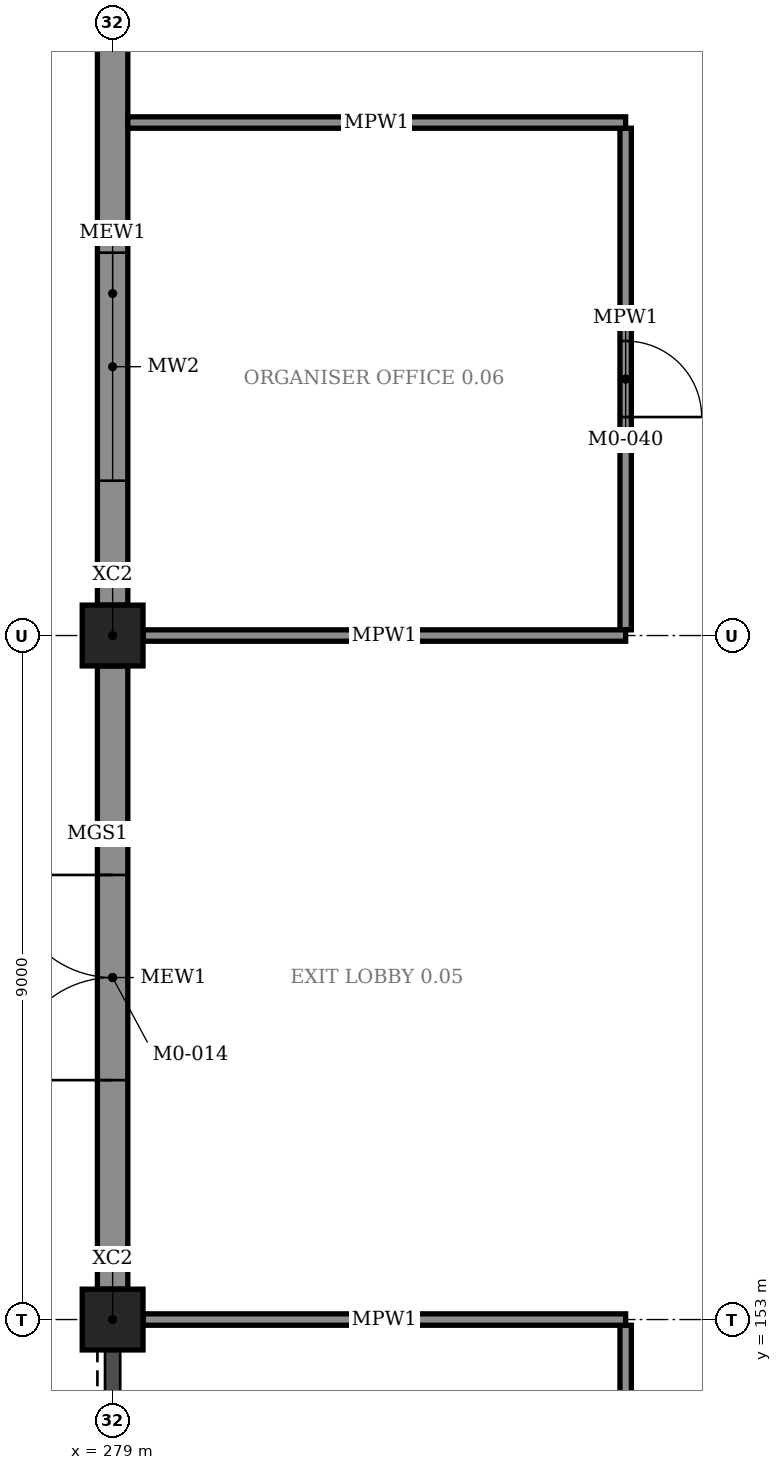
"""IFC4 building model, lengths in metres.
Left out: names, types, materials, properties, quantities, classifications, styles, units other than length and angle.
Written with IfcOpenShell. Run it as: python <this file> out.ifc"""

import sys

from ifc_helpers import new_model, si_unit, direction, frame, frame_2d, origin, origin_2d, place, context, subcontext, project, spatial, rectangle, extrude, element, fill, save


model = new_model("IFC4")
c1 = context("Model", 3, precision=1e-05, world=origin(), true_north=direction((0.0, 1.0)))
c2 = subcontext(c1, "Body", "Model", "MODEL_VIEW")
j1 = project(units=[si_unit("LENGTHUNIT", "METRE"), si_unit("PLANEANGLEUNIT", "RADIAN")], contexts=[c1])
p1 = place(None, origin())
s1 = spatial("IfcSite", under=j1, at=p1, CompositionType="ELEMENT")
p2 = place(p1, origin())
s2 = spatial("IfcBuilding", under=s1, at=p2, CompositionType="ELEMENT")
p3 = place(p2, origin())
s3 = spatial("IfcBuildingStorey", under=s2, at=p3, CompositionType="ELEMENT", Elevation=0.0)
for number, where, z_axis, x_axis in (
    (1, (279.0, 153.0, -0.3), (0.0, 0.0, 1.0), (1.0, 0.0, 0.0)),
    (2, (279.0, 162.0, -0.3), (0.0, 0.0, 1.0), (1.0, 0.0, 0.0)),
):
    element("IfcColumn", number, at=place(p3, frame(where, z_axis=z_axis, x_axis=x_axis)), inside=s3, PredefinedType="COLUMN", context=c2, shape_type="SweptSolid", body=[
        extrude(rectangle(XDim=0.8, YDim=0.8, at=origin_2d()), origin(), (0.0, 0.0, 1.0), 6.3),
    ])
p4 = place(p3, frame((279.0, 153.4, 0.0), z_axis=(0.0, 0.0, 1.0), x_axis=(0.0, 1.0, 0.0)))
e3 = element("IfcWall", 3, at=p4, inside=s3, PredefinedType="STANDARD", context=c2, shape_type="SweptSolid", body=[
    extrude(rectangle(XDim=8.2, YDim=0.4, at=frame_2d((4.1, 0.0))), origin(), (0.0, 0.0, 1.0), 4.82),
])
p5 = place(p4, frame((2.75, 0.0, 0.0)))
e4 = element("IfcOpeningElement", 4, at=p5, cuts=e3, PredefinedType="OPENING", context=c2, shape_type="SweptSolid", body=[
    extrude(rectangle(XDim=2.7, YDim=2.4, at=frame_2d((1.35, 1.2))), frame((0.0, 0.21, 0.0), z_axis=(0.0, -1.0, 0.0), x_axis=(1.0, 0.0, 0.0)), (0.0, 0.0, 1.0), 0.42),
])
p6 = place(p3, frame((279.0, 162.4, 0.0), z_axis=(0.0, 0.0, 1.0), x_axis=(0.0, 1.0, 0.0)))
e5 = element("IfcWall", 5, at=p6, inside=s3, PredefinedType="STANDARD", context=c2, shape_type="SweptSolid", body=[
    extrude(rectangle(XDim=8.2, YDim=0.4, at=frame_2d((4.1, 0.0))), origin(), (0.0, 0.0, 1.0), 4.82),
])
p7 = place(p6, frame((1.638, 0.0, 0.9)))
e6 = element("IfcOpeningElement", 6, at=p7, cuts=e5, PredefinedType="OPENING", context=c2, shape_type="SweptSolid", body=[
    extrude(rectangle(XDim=3.0, YDim=2.1, at=frame_2d((1.5, 1.05))), frame((0.0, 0.21, 0.0), z_axis=(0.0, -1.0, 0.0), x_axis=(1.0, 0.0, 0.0)), (0.0, 0.0, 1.0), 0.42),
])
p8 = place(p3, frame((279.4, 153.0, 0.0), z_axis=(0.0, 0.0, 1.0), x_axis=(1.0, 0.0, 0.0)))
e7 = element("IfcWall", 7, at=p8, inside=s3, PredefinedType="PARTITIONING", context=c2, shape_type="SweptSolid", body=[
    extrude(rectangle(XDim=6.35, YDim=0.15, at=frame_2d((3.175, 0.0))), origin(), (0.0, 0.0, 1.0), 4.82),
])
p9 = place(p3, frame((285.75, 135.075, 0.0), z_axis=(0.0, 0.0, 1.0), x_axis=(0.0, 1.0, 0.0)))
e8 = element("IfcWall", 8, at=p9, inside=s3, PredefinedType="PARTITIONING", context=c2, shape_type="SweptSolid", body=[
    extrude(rectangle(XDim=17.85, YDim=0.15, at=frame_2d((8.925, 0.0))), origin(), (0.0, 0.0, 1.0), 4.82),
])
p10 = place(p9, frame((8.025, 0.0, 0.0)))
e9 = element("IfcOpeningElement", 9, at=p10, cuts=e8, PredefinedType="OPENING", context=c2, shape_type="SweptSolid", body=[
    extrude(rectangle(XDim=1.8, YDim=2.4, at=frame_2d((0.9, 1.2))), frame((0.0, 0.085, 0.0), z_axis=(0.0, -1.0, 0.0), x_axis=(1.0, 0.0, 0.0)), (0.0, 0.0, 1.0), 0.17),
])
p11 = place(p3, frame((279.4, 162.0, 0.0), z_axis=(0.0, 0.0, 1.0), x_axis=(1.0, 0.0, 0.0)))
e10 = element("IfcWall", 10, at=p11, inside=s3, PredefinedType="PARTITIONING", context=c2, shape_type="SweptSolid", body=[
    extrude(rectangle(XDim=6.35, YDim=0.15, at=frame_2d((3.175, 0.0))), origin(), (0.0, 0.0, 1.0), 4.82),
])
p12 = place(p3, frame((279.2, 168.75, 0.0), z_axis=(0.0, 0.0, 1.0), x_axis=(1.0, 0.0, 0.0)))
e11 = element("IfcWall", 11, at=p12, inside=s3, PredefinedType="PARTITIONING", context=c2, shape_type="SweptSolid", body=[
    extrude(rectangle(XDim=6.55, YDim=0.15, at=frame_2d((3.275, 0.0))), origin(), (0.0, 0.0, 1.0), 4.82),
])
p13 = place(p3, frame((285.75, 162.075, 0.0), z_axis=(0.0, 0.0, 1.0), x_axis=(0.0, 1.0, 0.0)))
e12 = element("IfcWall", 12, at=p13, inside=s3, PredefinedType="PARTITIONING", context=c2, shape_type="SweptSolid", body=[
    extrude(rectangle(XDim=6.6, YDim=0.15, at=frame_2d((3.3, 0.0))), origin(), (0.0, 0.0, 1.0), 4.82),
])
p14 = place(p13, frame((2.8, 0.0, 0.0)))
e13 = element("IfcOpeningElement", 13, at=p14, cuts=e12, PredefinedType="OPENING", context=c2, shape_type="SweptSolid", body=[
    extrude(rectangle(XDim=1.0, YDim=2.4, at=frame_2d((0.5, 1.2))), frame((0.0, 0.085, 0.0), z_axis=(0.0, -1.0, 0.0), x_axis=(1.0, 0.0, 0.0)), (0.0, 0.0, 1.0), 0.17),
])
p15 = place(p5, origin())
e14 = element("IfcDoor", 14, at=p15, inside=s3, OperationType="DOUBLE_DOOR_SINGLE_SWING", PredefinedType="DOOR", context=c2, shape_type="SweptSolid", body=[
    extrude(rectangle(XDim=2.7, YDim=2.4, at=frame_2d((1.35, 1.2))), frame((0.0, 0.025, 0.0), z_axis=(0.0, -1.0, 0.0), x_axis=(1.0, 0.0, 0.0)), (0.0, 0.0, 1.0), 0.05),
])
fill(e4, e14)
p16 = place(p7, origin())
e15 = element("IfcWindow", 15, at=p16, inside=s3, PartitioningType="TRIPLE_PANEL_VERTICAL", PredefinedType="WINDOW", context=c2, shape_type="SweptSolid", body=[
    extrude(rectangle(XDim=3.0, YDim=2.1, at=frame_2d((1.5, 1.05))), frame((0.0, 0.03, 0.0), z_axis=(0.0, -1.0, 0.0), x_axis=(1.0, 0.0, 0.0)), (0.0, 0.0, 1.0), 0.06),
])
fill(e6, e15)
p17 = place(p14, frame((1.0, 0.0, 0.0), z_axis=(0.0, 0.0, 1.0), x_axis=(-1.0, 0.0, 0.0)))
e16 = element("IfcDoor", 16, at=p17, inside=s3, OperationType="SINGLE_SWING_LEFT", PredefinedType="DOOR", context=c2, shape_type="SweptSolid", body=[
    extrude(rectangle(XDim=1.0, YDim=2.4, at=frame_2d((0.5, 1.2))), frame((0.0, 0.025, 0.0), z_axis=(0.0, -1.0, 0.0), x_axis=(1.0, 0.0, 0.0)), (0.0, 0.0, 1.0), 0.05),
])
fill(e13, e16)
save(model, sys.argv[1])
